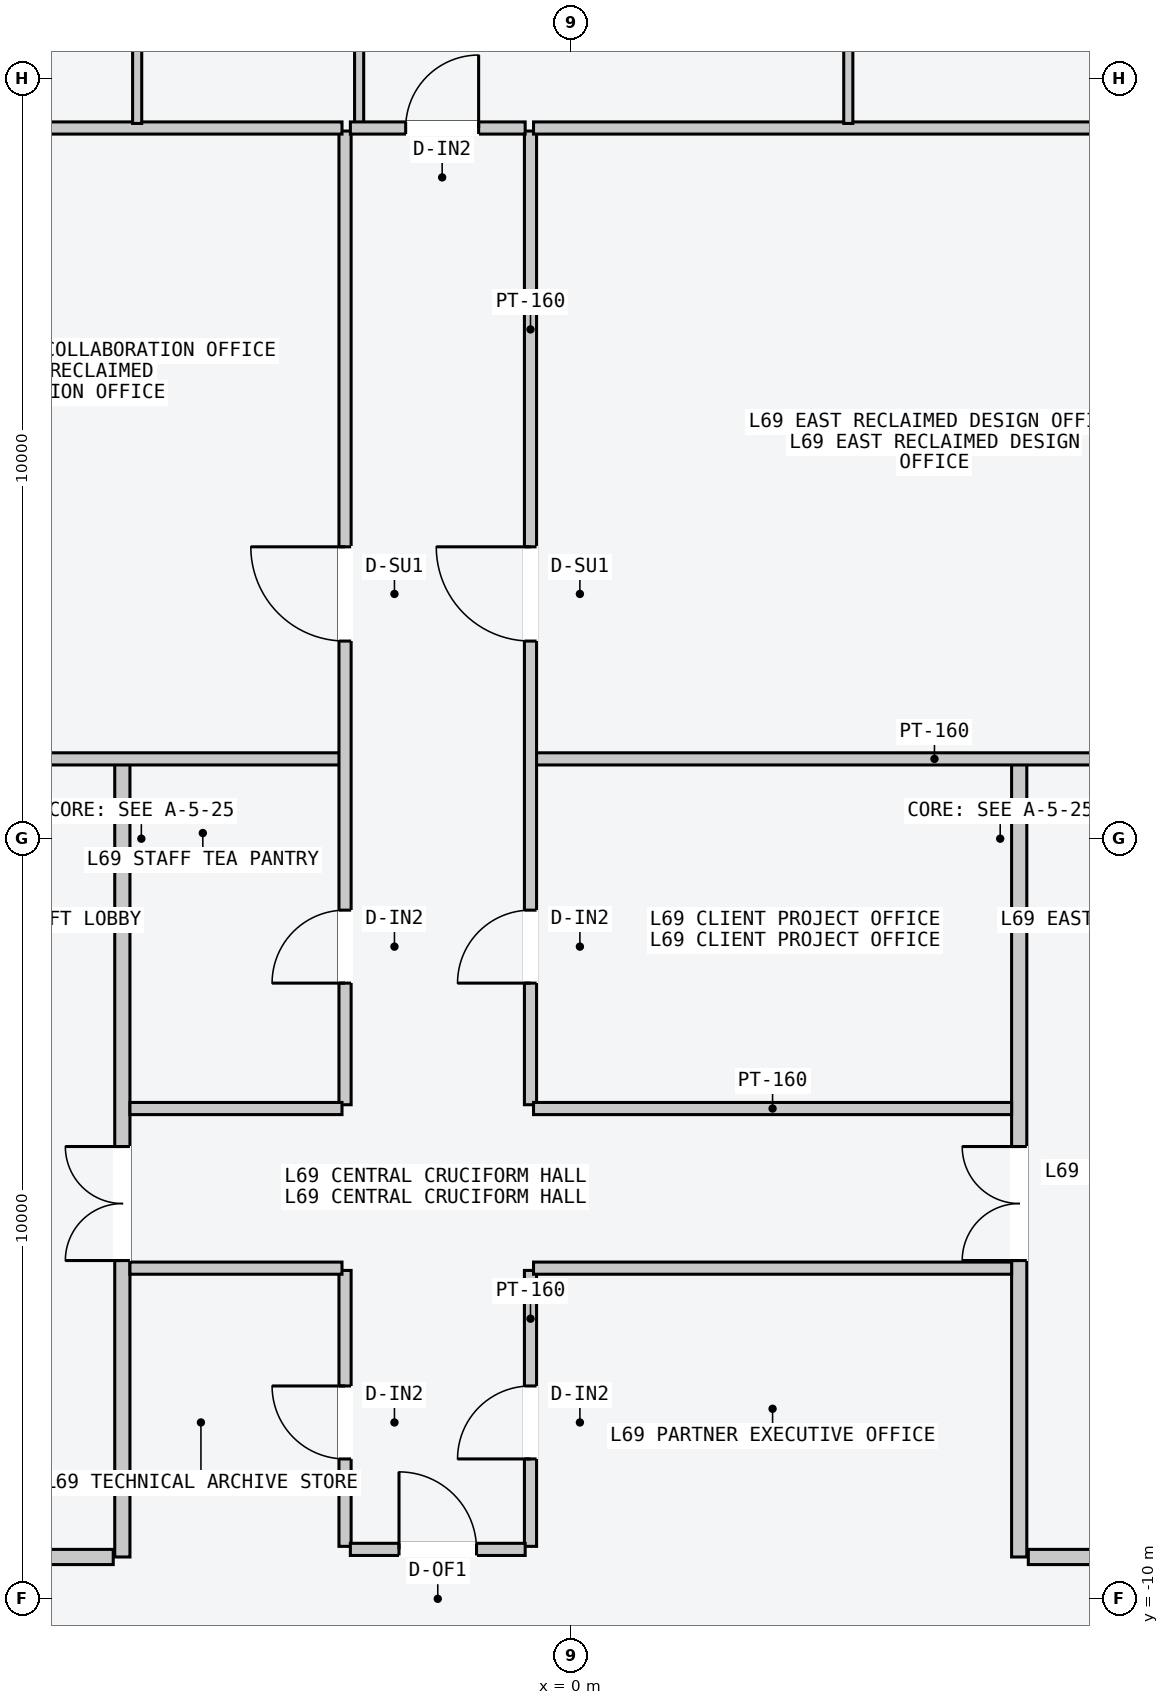
"""IFC4 building model, lengths in metres.
Left out: names, types, materials, properties, quantities, classifications, styles, units other than length and angle.
Written with IfcOpenShell. Run it as: python <this file> out.ifc"""

import sys

from ifc_helpers import new_model, si_unit, direction, frame, frame_2d, origin, place, context, subcontext, project, spatial, rectangle, extrude, element, fill, save


model = new_model("IFC4")
c1 = context("Model", 3, precision=1e-05, world=origin(), true_north=direction((0.0, 1.0)))
c2 = subcontext(c1, "Body", "Model", "MODEL_VIEW")
j1 = project(units=[si_unit("LENGTHUNIT", "METRE"), si_unit("PLANEANGLEUNIT", "RADIAN")], contexts=[c1])
p1 = place(None, origin())
s1 = spatial("IfcSite", under=j1, at=p1, CompositionType="ELEMENT")
p2 = place(p1, origin())
s2 = spatial("IfcBuilding", under=s1, at=p2, CompositionType="ELEMENT")
p3 = place(p2, frame((0.0, 0.0, 261.6)))
s3 = spatial("IfcBuildingStorey", under=s2, at=p3, CompositionType="ELEMENT", Elevation=261.6)
p4 = place(p3, frame((-5.9, -9.45, 0.0), z_axis=(0.0, 0.0, 1.0), x_axis=(0.0, 1.0, 0.0)))
e1 = element("IfcWall", 1, at=p4, inside=s3, PredefinedType="PARTITIONING", context=c2, shape_type="SweptSolid", body=[
    extrude(rectangle(XDim=10.5, YDim=0.2, at=frame_2d((5.25, 0.0))), origin(), (0.0, 0.0, 1.0), 3.4),
])
p5 = place(p4, frame((3.9, 0.0, 0.0)))
e2 = element("IfcOpeningElement", 2, at=p5, cuts=e1, PredefinedType="OPENING", context=c2, shape_type="SweptSolid", body=[
    extrude(rectangle(XDim=1.5, YDim=2.2, at=frame_2d((0.75, 1.1))), frame((0.0, 0.11, 0.0), z_axis=(0.0, -1.0, 0.0), x_axis=(1.0, 0.0, 0.0)), (0.0, 0.0, 1.0), 0.22),
])
p6 = place(p3, frame((-6.02, -9.45, 0.0), z_axis=(0.0, 0.0, 1.0), x_axis=(-1.0, 0.0, 0.0)))
e3 = element("IfcWall", 3, at=p6, inside=s3, PredefinedType="PARTITIONING", context=c2, shape_type="SweptSolid", body=[
    extrude(rectangle(XDim=1.8, YDim=0.2, at=frame_2d((0.9, 0.0))), origin(), (0.0, 0.0, 1.0), 3.4),
])
p7 = place(p3, frame((5.9, -9.45, 0.0), z_axis=(0.0, 0.0, 1.0), x_axis=(0.0, 1.0, 0.0)))
e4 = element("IfcWall", 4, at=p7, inside=s3, PredefinedType="PARTITIONING", context=c2, shape_type="SweptSolid", body=[
    extrude(rectangle(XDim=10.5, YDim=0.2, at=frame_2d((5.25, 0.0))), origin(), (0.0, 0.0, 1.0), 3.4),
])
p8 = place(p7, frame((3.9, 0.0, 0.0)))
e5 = element("IfcOpeningElement", 5, at=p8, cuts=e4, PredefinedType="OPENING", context=c2, shape_type="SweptSolid", body=[
    extrude(rectangle(XDim=1.5, YDim=2.2, at=frame_2d((0.75, 1.1))), frame((0.0, 0.11, 0.0), z_axis=(0.0, -1.0, 0.0), x_axis=(1.0, 0.0, 0.0)), (0.0, 0.0, 1.0), 0.22),
])
p9 = place(p3, frame((6.02, -9.45, 0.0), z_axis=(0.0, 0.0, 1.0), x_axis=(1.0, 0.0, 0.0)))
e6 = element("IfcWall", 6, at=p9, inside=s3, PredefinedType="PARTITIONING", context=c2, shape_type="SweptSolid", body=[
    extrude(rectangle(XDim=1.8, YDim=0.2, at=frame_2d((0.9, 0.0))), origin(), (0.0, 0.0, 1.0), 3.4),
])
p10 = place(p3, frame((-10.05, 1.05, 0.0), z_axis=(0.0, 0.0, 1.0), x_axis=(1.0, 0.0, 0.0)))
e7 = element("IfcWall", 7, at=p10, inside=s3, PredefinedType="PARTITIONING", context=c2, shape_type="SweptSolid", body=[
    extrude(rectangle(XDim=7.04, YDim=0.16, at=frame_2d((3.52, 0.0))), origin(), (0.0, 0.0, 1.0), 3.4),
])
p11 = place(p3, frame((-2.97, -3.5, 0.0), z_axis=(0.0, 0.0, 1.0), x_axis=(0.0, 1.0, 0.0)))
e8 = element("IfcWall", 8, at=p11, inside=s3, PredefinedType="PARTITIONING", context=c2, shape_type="SweptSolid", body=[
    extrude(rectangle(XDim=12.81, YDim=0.16, at=frame_2d((6.405, 0.0))), origin(), (0.0, 0.0, 1.0), 3.4),
])
p12 = place(p11, frame((6.1, 0.0, 0.0)))
e9 = element("IfcOpeningElement", 9, at=p12, cuts=e8, PredefinedType="OPENING", context=c2, shape_type="SweptSolid", body=[
    extrude(rectangle(XDim=1.24, YDim=2.24, at=frame_2d((0.62, 1.12))), frame((0.0, 0.09, 0.0), z_axis=(0.0, -1.0, 0.0), x_axis=(1.0, 0.0, 0.0)), (0.0, 0.0, 1.0), 0.18),
])
p13 = place(p11, frame((1.6, 0.0, 0.0)))
e10 = element("IfcOpeningElement", 10, at=p13, cuts=e8, PredefinedType="OPENING", context=c2, shape_type="SweptSolid", body=[
    extrude(rectangle(XDim=0.96, YDim=2.18, at=frame_2d((0.48, 1.09))), frame((0.0, 0.09, 0.0), z_axis=(0.0, -1.0, 0.0), x_axis=(1.0, 0.0, 0.0)), (0.0, 0.0, 1.0), 0.18),
])
p14 = place(p3, frame((-7.5, 9.35, 0.0), z_axis=(0.0, 0.0, 1.0), x_axis=(1.0, 0.0, 0.0)))
e11 = element("IfcWall", 11, at=p14, inside=s3, PredefinedType="PARTITIONING", context=c2, shape_type="SweptSolid", body=[
    extrude(rectangle(XDim=4.49, YDim=0.16, at=frame_2d((2.245, 0.0))), origin(), (0.0, 0.0, 1.0), 3.4),
])
p15 = place(p3, frame((-5.8, -3.55, 0.0), z_axis=(0.0, 0.0, 1.0), x_axis=(1.0, 0.0, 0.0)))
e12 = element("IfcWall", 12, at=p15, inside=s3, PredefinedType="PARTITIONING", context=c2, shape_type="SweptSolid", body=[
    extrude(rectangle(XDim=2.79, YDim=0.16, at=frame_2d((1.395, 0.0))), origin(), (0.0, 0.0, 1.0), 3.4),
])
p16 = place(p3, frame((-0.49, 1.05, 0.0), z_axis=(0.0, 0.0, 1.0), x_axis=(1.0, 0.0, 0.0)))
e13 = element("IfcWall", 13, at=p16, inside=s3, PredefinedType="PARTITIONING", context=c2, shape_type="SweptSolid", body=[
    extrude(rectangle(XDim=10.55, YDim=0.16, at=frame_2d((5.275, 0.0))), origin(), (0.0, 0.0, 1.0), 3.4),
])
p17 = place(p3, frame((-0.53, -3.5, 0.0), z_axis=(0.0, 0.0, 1.0), x_axis=(0.0, 1.0, 0.0)))
e14 = element("IfcWall", 14, at=p17, inside=s3, PredefinedType="PARTITIONING", context=c2, shape_type="SweptSolid", body=[
    extrude(rectangle(XDim=12.81, YDim=0.16, at=frame_2d((6.405, 0.0))), origin(), (0.0, 0.0, 1.0), 3.4),
])
p18 = place(p17, frame((6.1, 0.0, 0.0)))
e15 = element("IfcOpeningElement", 15, at=p18, cuts=e14, PredefinedType="OPENING", context=c2, shape_type="SweptSolid", body=[
    extrude(rectangle(XDim=1.24, YDim=2.24, at=frame_2d((0.62, 1.12))), frame((0.0, 0.09, 0.0), z_axis=(0.0, -1.0, 0.0), x_axis=(1.0, 0.0, 0.0)), (0.0, 0.0, 1.0), 0.18),
])
p19 = place(p17, frame((1.6, 0.0, 0.0)))
e16 = element("IfcOpeningElement", 16, at=p19, cuts=e14, PredefinedType="OPENING", context=c2, shape_type="SweptSolid", body=[
    extrude(rectangle(XDim=0.96, YDim=2.18, at=frame_2d((0.48, 1.09))), frame((0.0, 0.09, 0.0), z_axis=(0.0, -1.0, 0.0), x_axis=(1.0, 0.0, 0.0)), (0.0, 0.0, 1.0), 0.18),
])
p20 = place(p3, frame((-0.49, 9.35, 0.0), z_axis=(0.0, 0.0, 1.0), x_axis=(1.0, 0.0, 0.0)))
e17 = element("IfcWall", 17, at=p20, inside=s3, PredefinedType="PARTITIONING", context=c2, shape_type="SweptSolid", body=[
    extrude(rectangle(XDim=7.99, YDim=0.16, at=frame_2d((3.995, 0.0))), origin(), (0.0, 0.0, 1.0), 3.4),
])
p21 = place(p3, frame((-0.49, -3.55, 0.0), z_axis=(0.0, 0.0, 1.0), x_axis=(1.0, 0.0, 0.0)))
e18 = element("IfcWall", 18, at=p21, inside=s3, PredefinedType="PARTITIONING", context=c2, shape_type="SweptSolid", body=[
    extrude(rectangle(XDim=6.29, YDim=0.16, at=frame_2d((3.145, 0.0))), origin(), (0.0, 0.0, 1.0), 3.4),
])
p22 = place(p3, frame((-2.97, -9.31, 0.0), z_axis=(0.0, 0.0, 1.0), x_axis=(0.0, 1.0, 0.0)))
e19 = element("IfcWall", 19, at=p22, inside=s3, PredefinedType="PARTITIONING", context=c2, shape_type="SweptSolid", body=[
    extrude(rectangle(XDim=3.63, YDim=0.16, at=frame_2d((1.815, 0.0))), origin(), (0.0, 0.0, 1.0), 3.4),
])
p23 = place(p22, frame((1.15, 0.0, 0.0)))
e20 = element("IfcOpeningElement", 20, at=p23, cuts=e19, PredefinedType="OPENING", context=c2, shape_type="SweptSolid", body=[
    extrude(rectangle(XDim=0.96, YDim=2.18, at=frame_2d((0.48, 1.09))), frame((0.0, 0.09, 0.0), z_axis=(0.0, -1.0, 0.0), x_axis=(1.0, 0.0, 0.0)), (0.0, 0.0, 1.0), 0.18),
])
p24 = place(p3, frame((-0.53, -9.31, 0.0), z_axis=(0.0, 0.0, 1.0), x_axis=(0.0, 1.0, 0.0)))
e21 = element("IfcWall", 21, at=p24, inside=s3, PredefinedType="PARTITIONING", context=c2, shape_type="SweptSolid", body=[
    extrude(rectangle(XDim=3.63, YDim=0.16, at=frame_2d((1.815, 0.0))), origin(), (0.0, 0.0, 1.0), 3.4),
])
p25 = place(p24, frame((1.15, 0.0, 0.0)))
e22 = element("IfcOpeningElement", 22, at=p25, cuts=e21, PredefinedType="OPENING", context=c2, shape_type="SweptSolid", body=[
    extrude(rectangle(XDim=0.96, YDim=2.18, at=frame_2d((0.48, 1.09))), frame((0.0, 0.09, 0.0), z_axis=(0.0, -1.0, 0.0), x_axis=(1.0, 0.0, 0.0)), (0.0, 0.0, 1.0), 0.18),
])
p26 = place(p3, frame((-5.8, -5.65, 0.0), z_axis=(0.0, 0.0, 1.0), x_axis=(1.0, 0.0, 0.0)))
e23 = element("IfcWall", 23, at=p26, inside=s3, PredefinedType="PARTITIONING", context=c2, shape_type="SweptSolid", body=[
    extrude(rectangle(XDim=2.79, YDim=0.16, at=frame_2d((1.395, 0.0))), origin(), (0.0, 0.0, 1.0), 3.4),
])
p27 = place(p3, frame((-0.49, -5.65, 0.0), z_axis=(0.0, 0.0, 1.0), x_axis=(1.0, 0.0, 0.0)))
e24 = element("IfcWall", 24, at=p27, inside=s3, PredefinedType="PARTITIONING", context=c2, shape_type="SweptSolid", body=[
    extrude(rectangle(XDim=6.29, YDim=0.16, at=frame_2d((3.145, 0.0))), origin(), (0.0, 0.0, 1.0), 3.4),
])
p28 = place(p3, frame((-5.705, 9.41, 0.0), z_axis=(0.0, 0.0, 1.0), x_axis=(0.0, 1.0, 0.0)))
e25 = element("IfcWall", 25, at=p28, inside=s3, PredefinedType="PARTITIONING", context=c2, shape_type="SweptSolid", body=[
    extrude(rectangle(XDim=8.15, YDim=0.12, at=frame_2d((4.075, 0.0))), origin(), (0.0, 0.0, 1.0), 3.4),
])
p29 = place(p28, frame((1.15, 0.0, 0.0)))
e26 = element("IfcOpeningElement", 26, at=p29, cuts=e25, PredefinedType="OPENING", context=c2, shape_type="SweptSolid", body=[
    extrude(rectangle(XDim=0.96, YDim=2.18, at=frame_2d((0.48, 1.09))), frame((0.0, 0.07, 0.0), z_axis=(0.0, -1.0, 0.0), x_axis=(1.0, 0.0, 0.0)), (0.0, 0.0, 1.0), 0.14),
])
p30 = place(p3, frame((-2.785, 9.41, 0.0), z_axis=(0.0, 0.0, 1.0), x_axis=(0.0, 1.0, 0.0)))
e27 = element("IfcWall", 27, at=p30, inside=s3, PredefinedType="PARTITIONING", context=c2, shape_type="SweptSolid", body=[
    extrude(rectangle(XDim=8.15, YDim=0.12, at=frame_2d((4.075, 0.0))), origin(), (0.0, 0.0, 1.0), 3.4),
])
p31 = place(p30, frame((1.15, 0.0, 0.0)))
e28 = element("IfcOpeningElement", 28, at=p31, cuts=e27, PredefinedType="OPENING", context=c2, shape_type="SweptSolid", body=[
    extrude(rectangle(XDim=0.96, YDim=2.18, at=frame_2d((0.48, 1.09))), frame((0.0, 0.07, 0.0), z_axis=(0.0, -1.0, 0.0), x_axis=(1.0, 0.0, 0.0)), (0.0, 0.0, 1.0), 0.14),
])
p32 = place(p3, frame((3.651, 9.41, 0.0), z_axis=(0.0, 0.0, 1.0), x_axis=(0.0, 1.0, 0.0)))
e29 = element("IfcWall", 29, at=p32, inside=s3, PredefinedType="PARTITIONING", context=c2, shape_type="SweptSolid", body=[
    extrude(rectangle(XDim=8.15, YDim=0.12, at=frame_2d((4.075, 0.0))), origin(), (0.0, 0.0, 1.0), 3.4),
])
p33 = place(p32, frame((1.15, 0.0, 0.0)))
e30 = element("IfcOpeningElement", 30, at=p33, cuts=e29, PredefinedType="OPENING", context=c2, shape_type="SweptSolid", body=[
    extrude(rectangle(XDim=0.96, YDim=2.18, at=frame_2d((0.48, 1.09))), frame((0.0, 0.07, 0.0), z_axis=(0.0, -1.0, 0.0), x_axis=(1.0, 0.0, 0.0)), (0.0, 0.0, 1.0), 0.14),
])
p34 = place(p3, frame((-2.9, 9.35, 0.0), z_axis=(0.0, 0.0, 1.0), x_axis=(1.0, 0.0, 0.0)))
e31 = element("IfcWall", 31, at=p34, inside=s3, PredefinedType="PARTITIONING", context=c2, shape_type="SweptSolid", body=[
    extrude(rectangle(XDim=2.3, YDim=0.16, at=frame_2d((1.15, 0.0))), origin(), (0.0, 0.0, 1.0), 3.4),
])
p35 = place(p34, frame((0.728, 0.0, 0.0)))
e32 = element("IfcOpeningElement", 32, at=p35, cuts=e31, PredefinedType="OPENING", context=c2, shape_type="SweptSolid", body=[
    extrude(rectangle(XDim=0.96, YDim=2.18, at=frame_2d((0.48, 1.09))), frame((0.0, 0.09, 0.0), z_axis=(0.0, -1.0, 0.0), x_axis=(1.0, 0.0, 0.0)), (0.0, 0.0, 1.0), 0.18),
])
p36 = place(p3, frame((-2.9, -9.35, 0.0), z_axis=(0.0, 0.0, 1.0), x_axis=(1.0, 0.0, 0.0)))
e33 = element("IfcWall", 33, at=p36, inside=s3, PredefinedType="PARTITIONING", context=c2, shape_type="SweptSolid", body=[
    extrude(rectangle(XDim=2.3, YDim=0.16, at=frame_2d((1.15, 0.0))), origin(), (0.0, 0.0, 1.0), 3.4),
])
p37 = place(p36, frame((0.64, 0.0, 0.0)))
e34 = element("IfcOpeningElement", 34, at=p37, cuts=e33, PredefinedType="OPENING", context=c2, shape_type="SweptSolid", body=[
    extrude(rectangle(XDim=1.02, YDim=2.2, at=frame_2d((0.51, 1.1))), frame((0.0, 0.09, 0.0), z_axis=(0.0, -1.0, 0.0), x_axis=(1.0, 0.0, 0.0)), (0.0, 0.0, 1.0), 0.18),
])
p38 = place(p5, origin())
e35 = element("IfcDoor", 35, at=p38, inside=s3, OperationType="DOUBLE_DOOR_SINGLE_SWING", PredefinedType="DOOR", context=c2, shape_type="SweptSolid", body=[
    extrude(rectangle(XDim=1.5, YDim=2.2, at=frame_2d((0.75, 1.1))), frame((0.0, 0.025, 0.0), z_axis=(0.0, -1.0, 0.0), x_axis=(1.0, 0.0, 0.0)), (0.0, 0.0, 1.0), 0.05),
])
fill(e2, e35)
p39 = place(p8, origin())
e36 = element("IfcDoor", 36, at=p39, inside=s3, OperationType="DOUBLE_DOOR_SINGLE_SWING", PredefinedType="DOOR", context=c2, shape_type="SweptSolid", body=[
    extrude(rectangle(XDim=1.5, YDim=2.2, at=frame_2d((0.75, 1.1))), frame((0.0, 0.025, 0.0), z_axis=(0.0, -1.0, 0.0), x_axis=(1.0, 0.0, 0.0)), (0.0, 0.0, 1.0), 0.05),
])
fill(e5, e36)
p40 = place(p12, origin())
e37 = element("IfcDoor", 37, at=p40, inside=s3, OperationType="SINGLE_SWING_RIGHT", PredefinedType="DOOR", context=c2, shape_type="SweptSolid", body=[
    extrude(rectangle(XDim=1.24, YDim=2.24, at=frame_2d((0.62, 1.12))), frame((0.0, 0.025, 0.0), z_axis=(0.0, -1.0, 0.0), x_axis=(1.0, 0.0, 0.0)), (0.0, 0.0, 1.0), 0.05),
])
fill(e9, e37)
p41 = place(p13, origin())
e38 = element("IfcDoor", 38, at=p41, inside=s3, OperationType="SINGLE_SWING_LEFT", PredefinedType="DOOR", context=c2, shape_type="SweptSolid", body=[
    extrude(rectangle(XDim=0.96, YDim=2.18, at=frame_2d((0.48, 1.09))), frame((0.0, 0.025, 0.0), z_axis=(0.0, -1.0, 0.0), x_axis=(1.0, 0.0, 0.0)), (0.0, 0.0, 1.0), 0.05),
])
fill(e10, e38)
p42 = place(p18, origin())
e39 = element("IfcDoor", 39, at=p42, inside=s3, OperationType="SINGLE_SWING_RIGHT", PredefinedType="DOOR", context=c2, shape_type="SweptSolid", body=[
    extrude(rectangle(XDim=1.24, YDim=2.24, at=frame_2d((0.62, 1.12))), frame((0.0, 0.025, 0.0), z_axis=(0.0, -1.0, 0.0), x_axis=(1.0, 0.0, 0.0)), (0.0, 0.0, 1.0), 0.05),
])
fill(e15, e39)
p43 = place(p19, origin())
e40 = element("IfcDoor", 40, at=p43, inside=s3, OperationType="SINGLE_SWING_LEFT", PredefinedType="DOOR", context=c2, shape_type="SweptSolid", body=[
    extrude(rectangle(XDim=0.96, YDim=2.18, at=frame_2d((0.48, 1.09))), frame((0.0, 0.025, 0.0), z_axis=(0.0, -1.0, 0.0), x_axis=(1.0, 0.0, 0.0)), (0.0, 0.0, 1.0), 0.05),
])
fill(e16, e40)
p44 = place(p23, origin())
e41 = element("IfcDoor", 41, at=p44, inside=s3, OperationType="SINGLE_SWING_RIGHT", PredefinedType="DOOR", context=c2, shape_type="SweptSolid", body=[
    extrude(rectangle(XDim=0.96, YDim=2.18, at=frame_2d((0.48, 1.09))), frame((0.0, 0.025, 0.0), z_axis=(0.0, -1.0, 0.0), x_axis=(1.0, 0.0, 0.0)), (0.0, 0.0, 1.0), 0.05),
])
fill(e20, e41)
p45 = place(p25, origin())
e42 = element("IfcDoor", 42, at=p45, inside=s3, OperationType="SINGLE_SWING_LEFT", PredefinedType="DOOR", context=c2, shape_type="SweptSolid", body=[
    extrude(rectangle(XDim=0.96, YDim=2.18, at=frame_2d((0.48, 1.09))), frame((0.0, 0.025, 0.0), z_axis=(0.0, -1.0, 0.0), x_axis=(1.0, 0.0, 0.0)), (0.0, 0.0, 1.0), 0.05),
])
fill(e22, e42)
p46 = place(p35, origin())
e43 = element("IfcDoor", 43, at=p46, inside=s3, OperationType="SINGLE_SWING_RIGHT", PredefinedType="DOOR", context=c2, shape_type="SweptSolid", body=[
    extrude(rectangle(XDim=0.96, YDim=2.18, at=frame_2d((0.48, 1.09))), frame((0.0, 0.025, 0.0), z_axis=(0.0, -1.0, 0.0), x_axis=(1.0, 0.0, 0.0)), (0.0, 0.0, 1.0), 0.05),
])
fill(e32, e43)
p47 = place(p37, origin())
e44 = element("IfcDoor", 44, at=p47, inside=s3, OperationType="SINGLE_SWING_LEFT", PredefinedType="DOOR", context=c2, shape_type="SweptSolid", body=[
    extrude(rectangle(XDim=1.02, YDim=2.2, at=frame_2d((0.51, 1.1))), frame((0.0, 0.025, 0.0), z_axis=(0.0, -1.0, 0.0), x_axis=(1.0, 0.0, 0.0)), (0.0, 0.0, 1.0), 0.05),
])
fill(e34, e44)
save(model, sys.argv[1])
